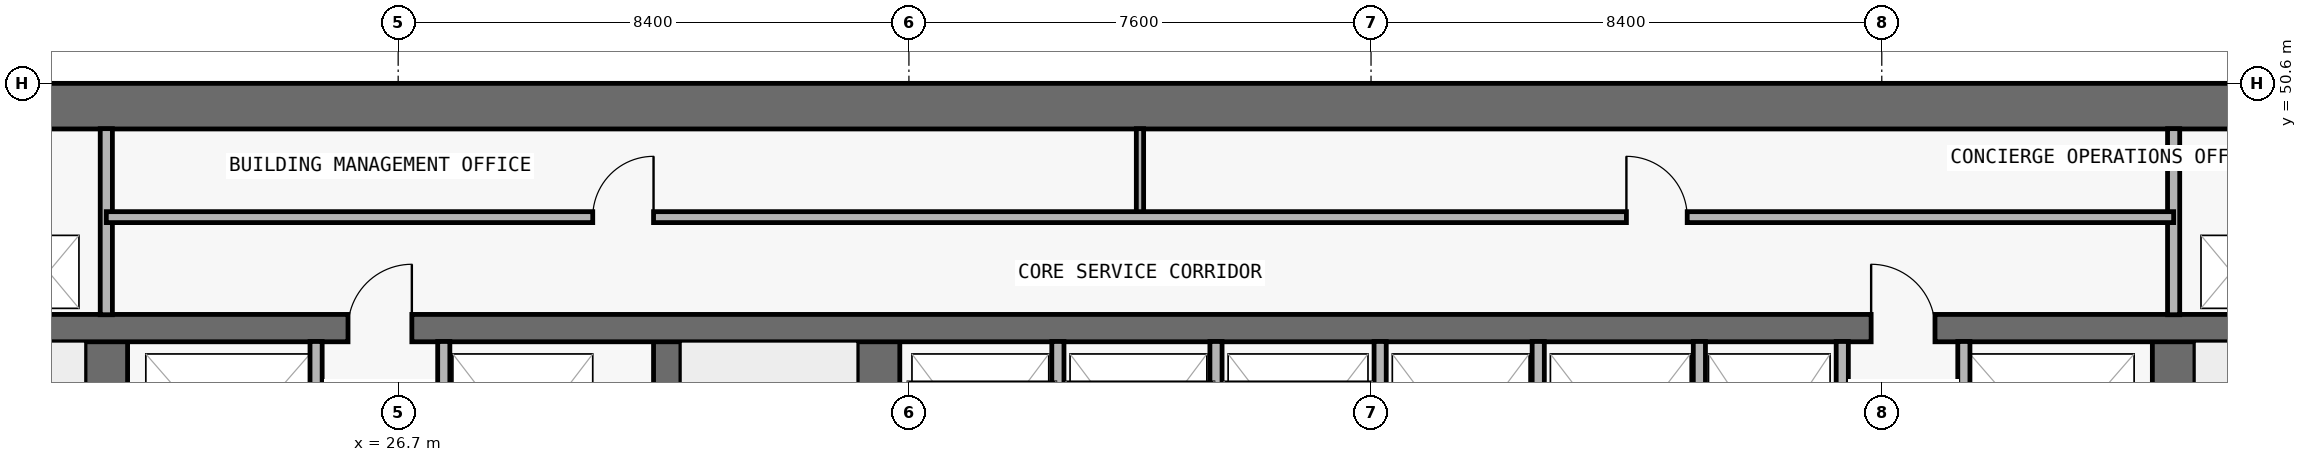
"""IFC4 building model, lengths in metres.
Left out: names, types, materials, properties, quantities, classifications, styles, units other than length and angle.
Written with IfcOpenShell. Run it as: python <this file> out.ifc"""

import sys

from ifc_helpers import new_model, si_unit, direction, frame, frame_2d, origin, place, context, subcontext, project, spatial, rectangle, extrude, element, fill, save


model = new_model("IFC4")
c1 = context("Model", 3, precision=1e-05, world=origin(), true_north=direction((0.0, 1.0)))
c2 = subcontext(c1, "Body", "Model", "MODEL_VIEW")
j1 = project(units=[si_unit("LENGTHUNIT", "METRE"), si_unit("PLANEANGLEUNIT", "RADIAN")], contexts=[c1])
p1 = place(None, origin())
s1 = spatial("IfcSite", under=j1, at=p1, CompositionType="ELEMENT")
p2 = place(p1, origin())
s2 = spatial("IfcBuilding", under=s1, at=p2, CompositionType="ELEMENT")
p3 = place(p2, frame((0.0, 0.0, 72.9)))
s3 = spatial("IfcBuildingStorey", under=s2, at=p3, CompositionType="ELEMENT", Elevation=72.9)
p4 = place(p3, frame((17.75, 50.225, 0.0), z_axis=(0.0, 0.0, 1.0), x_axis=(1.0, 0.0, 0.0)))
e1 = element("IfcWall", 1, at=p4, inside=s3, PredefinedType="SHEAR", context=c2, shape_type="SweptSolid", body=[
    extrude(rectangle(XDim=42.3, YDim=0.75, at=frame_2d((21.15, 0.0))), origin(), (0.0, 0.0, 1.0), 3.05),
])
p5 = place(p3, frame((21.9, 36.9, 0.0), z_axis=(0.0, 0.0, 1.0), x_axis=(0.0, 1.0, 0.0)))
e2 = element("IfcWall", 2, at=p5, inside=s3, PredefinedType="SHEAR", context=c2, shape_type="SweptSolid", body=[
    extrude(rectangle(XDim=9.675, YDim=0.7, at=frame_2d((4.837, 0.0))), origin(), (0.0, 0.0, 1.0), 3.05),
])
p6 = place(p5, frame((0.65, 0.0, 0.0)))
e3 = element("IfcOpeningElement", 3, at=p6, cuts=e2, PredefinedType="OPENING", context=c2, shape_type="SweptSolid", body=[
    extrude(rectangle(XDim=1.1, YDim=2.15, at=frame_2d((0.55, 1.075))), frame((0.0, 0.36, 0.0), z_axis=(0.0, -1.0, 0.0), x_axis=(1.0, 0.0, 0.0)), (0.0, 0.0, 1.0), 0.72),
])
p7 = place(p3, frame((55.9, 36.9, 0.0), z_axis=(0.0, 0.0, 1.0), x_axis=(0.0, 1.0, 0.0)))
e4 = element("IfcWall", 4, at=p7, inside=s3, PredefinedType="SHEAR", context=c2, shape_type="SweptSolid", body=[
    extrude(rectangle(XDim=9.675, YDim=0.7, at=frame_2d((4.837, 0.0))), origin(), (0.0, 0.0, 1.0), 3.05),
])
p8 = place(p7, frame((0.65, 0.0, 0.0)))
e5 = element("IfcOpeningElement", 5, at=p8, cuts=e4, PredefinedType="OPENING", context=c2, shape_type="SweptSolid", body=[
    extrude(rectangle(XDim=1.1, YDim=2.15, at=frame_2d((0.55, 1.075))), frame((0.0, 0.36, 0.0), z_axis=(0.0, -1.0, 0.0), x_axis=(1.0, 0.0, 0.0)), (0.0, 0.0, 1.0), 0.72),
])
p9 = place(p3, frame((31.125, 36.9, 0.0), z_axis=(0.0, 0.0, 1.0), x_axis=(0.0, 1.0, 0.0)))
e6 = element("IfcWall", 6, at=p9, inside=s3, PredefinedType="SHEAR", context=c2, shape_type="SweptSolid", body=[
    extrude(rectangle(XDim=9.675, YDim=0.45, at=frame_2d((4.837, 0.0))), origin(), (0.0, 0.0, 1.0), 3.05),
])
p10 = place(p3, frame((34.6, 36.9, 0.0), z_axis=(0.0, 0.0, 1.0), x_axis=(0.0, 1.0, 0.0)))
e7 = element("IfcWall", 7, at=p10, inside=s3, PredefinedType="SHEAR", context=c2, shape_type="SweptSolid", body=[
    extrude(rectangle(XDim=9.675, YDim=0.7, at=frame_2d((4.837, 0.0))), origin(), (0.0, 0.0, 1.0), 3.05),
])
p11 = place(p3, frame((18.2, 46.575, 0.0), z_axis=(0.0, 0.0, 1.0), x_axis=(1.0, 0.0, 0.0)))
e8 = element("IfcWall", 8, at=p11, inside=s3, PredefinedType="SHEAR", context=c2, shape_type="SweptSolid", body=[
    extrude(rectangle(XDim=41.4, YDim=0.45, at=frame_2d((20.7, 0.0))), origin(), (0.0, 0.0, 1.0), 3.05),
])
p12 = place(p11, frame((7.675, 0.0, 0.0)))
e9 = element("IfcOpeningElement", 9, at=p12, cuts=e8, PredefinedType="OPENING", context=c2, shape_type="SweptSolid", body=[
    extrude(rectangle(XDim=1.05, YDim=2.15, at=frame_2d((0.525, 1.075))), frame((0.0, 0.235, 0.0), z_axis=(0.0, -1.0, 0.0), x_axis=(1.0, 0.0, 0.0)), (0.0, 0.0, 1.0), 0.47),
])
p13 = place(p11, frame((32.725, 0.0, 0.0)))
e10 = element("IfcOpeningElement", 10, at=p13, cuts=e8, PredefinedType="OPENING", context=c2, shape_type="SweptSolid", body=[
    extrude(rectangle(XDim=1.05, YDim=2.15, at=frame_2d((0.525, 1.075))), frame((0.0, 0.235, 0.0), z_axis=(0.0, -1.0, 0.0), x_axis=(1.0, 0.0, 0.0)), (0.0, 0.0, 1.0), 0.47),
])
p14 = place(p3, frame((21.9, 46.795, 0.0), z_axis=(0.0, 0.0, 1.0), x_axis=(0.0, 1.0, 0.0)))
e11 = element("IfcWall", 11, at=p14, inside=s3, PredefinedType="PARTITIONING", context=c2, shape_type="SweptSolid", body=[
    extrude(rectangle(XDim=3.06, YDim=0.2, at=frame_2d((1.53, 0.0))), origin(), (0.0, 0.0, 1.0), 3.05),
])
for number, where, z_axis, x_axis in (
    (12, (25.35, 43.17, 0.0), (0.0, 0.0, 1.0), (0.0, 1.0, 0.0)),
    (13, (27.45, 43.17, 0.0), (0.0, 0.0, 1.0), (0.0, 1.0, 0.0)),
    (14, (37.55, 43.17, 0.0), (0.0, 0.0, 1.0), (0.0, 1.0, 0.0)),
):
    element("IfcWall", number, at=place(p3, frame(where, z_axis=z_axis, x_axis=x_axis)), inside=s3, PredefinedType="PARTITIONING", context=c2, shape_type="SweptSolid", body=[
        extrude(rectangle(XDim=3.185, YDim=0.2, at=frame_2d((1.593, 0.0))), origin(), (0.0, 0.0, 1.0), 3.05),
    ])
p15 = place(p3, frame((38.9, 48.4, 0.0), z_axis=(0.0, 0.0, 1.0), x_axis=(0.0, 1.0, 0.0)))
e15 = element("IfcWall", 15, at=p15, inside=s3, PredefinedType="PARTITIONING", context=c2, shape_type="SweptSolid", body=[
    extrude(rectangle(XDim=1.455, YDim=0.12, at=frame_2d((0.728, 0.0))), origin(), (0.0, 0.0, 1.0), 3.05),
])
for number, where, z_axis, x_axis in (
    (16, (40.15, 43.17, 0.0), (0.0, 0.0, 1.0), (0.0, 1.0, 0.0)),
    (17, (42.85, 43.17, 0.0), (0.0, 0.0, 1.0), (0.0, 1.0, 0.0)),
    (18, (45.45, 43.17, 0.0), (0.0, 0.0, 1.0), (0.0, 1.0, 0.0)),
    (19, (48.1, 43.17, 0.0), (0.0, 0.0, 1.0), (0.0, 1.0, 0.0)),
    (20, (50.45, 43.17, 0.0), (0.0, 0.0, 1.0), (0.0, 1.0, 0.0)),
    (21, (52.45, 43.17, 0.0), (0.0, 0.0, 1.0), (0.0, 1.0, 0.0)),
):
    element("IfcWall", number, at=place(p3, frame(where, z_axis=z_axis, x_axis=x_axis)), inside=s3, PredefinedType="PARTITIONING", context=c2, shape_type="SweptSolid", body=[
        extrude(rectangle(XDim=3.185, YDim=0.2, at=frame_2d((1.593, 0.0))), origin(), (0.0, 0.0, 1.0), 3.05),
    ])
p16 = place(p3, frame((55.9, 46.795, 0.0), z_axis=(0.0, 0.0, 1.0), x_axis=(0.0, 1.0, 0.0)))
e22 = element("IfcWall", 22, at=p16, inside=s3, PredefinedType="PARTITIONING", context=c2, shape_type="SweptSolid", body=[
    extrude(rectangle(XDim=3.06, YDim=0.2, at=frame_2d((1.53, 0.0))), origin(), (0.0, 0.0, 1.0), 3.05),
])
p17 = place(p3, frame((21.9, 48.4, 0.0), z_axis=(0.0, 0.0, 1.0), x_axis=(1.0, 0.0, 0.0)))
e23 = element("IfcWall", 23, at=p17, inside=s3, PredefinedType="PARTITIONING", context=c2, shape_type="SweptSolid", body=[
    extrude(rectangle(XDim=34.0, YDim=0.18, at=frame_2d((17.0, 0.0))), origin(), (0.0, 0.0, 1.0), 3.05),
])
p18 = place(p17, frame((8.0, 0.0, 0.0)))
e24 = element("IfcOpeningElement", 24, at=p18, cuts=e23, PredefinedType="OPENING", context=c2, shape_type="SweptSolid", body=[
    extrude(rectangle(XDim=1.0, YDim=2.2, at=frame_2d((0.5, 1.1))), frame((0.0, 0.1, 0.0), z_axis=(0.0, -1.0, 0.0), x_axis=(1.0, 0.0, 0.0)), (0.0, 0.0, 1.0), 0.2),
])
p19 = place(p17, frame((25.0, 0.0, 0.0)))
e25 = element("IfcOpeningElement", 25, at=p19, cuts=e23, PredefinedType="OPENING", context=c2, shape_type="SweptSolid", body=[
    extrude(rectangle(XDim=1.0, YDim=2.2, at=frame_2d((0.5, 1.1))), frame((0.0, 0.1, 0.0), z_axis=(0.0, -1.0, 0.0), x_axis=(1.0, 0.0, 0.0)), (0.0, 0.0, 1.0), 0.2),
])
p20 = place(p12, origin())
e26 = element("IfcDoor", 26, at=p20, inside=s3, OperationType="SINGLE_SWING_RIGHT", PredefinedType="DOOR", context=c2, shape_type="SweptSolid", body=[
    extrude(rectangle(XDim=1.05, YDim=2.15, at=frame_2d((0.525, 1.075))), frame((0.0, 0.025, 0.0), z_axis=(0.0, -1.0, 0.0), x_axis=(1.0, 0.0, 0.0)), (0.0, 0.0, 1.0), 0.05),
])
fill(e9, e26)
p21 = place(p13, origin())
e27 = element("IfcDoor", 27, at=p21, inside=s3, OperationType="SINGLE_SWING_LEFT", PredefinedType="DOOR", context=c2, shape_type="SweptSolid", body=[
    extrude(rectangle(XDim=1.05, YDim=2.15, at=frame_2d((0.525, 1.075))), frame((0.0, 0.025, 0.0), z_axis=(0.0, -1.0, 0.0), x_axis=(1.0, 0.0, 0.0)), (0.0, 0.0, 1.0), 0.05),
])
fill(e10, e27)
p22 = place(p18, origin())
e28 = element("IfcDoor", 28, at=p22, inside=s3, OperationType="SINGLE_SWING_RIGHT", PredefinedType="DOOR", context=c2, shape_type="SweptSolid", body=[
    extrude(rectangle(XDim=1.0, YDim=2.2, at=frame_2d((0.5, 1.1))), frame((0.0, 0.025, 0.0), z_axis=(0.0, -1.0, 0.0), x_axis=(1.0, 0.0, 0.0)), (0.0, 0.0, 1.0), 0.05),
])
fill(e24, e28)
p23 = place(p19, origin())
e29 = element("IfcDoor", 29, at=p23, inside=s3, OperationType="SINGLE_SWING_LEFT", PredefinedType="DOOR", context=c2, shape_type="SweptSolid", body=[
    extrude(rectangle(XDim=1.0, YDim=2.2, at=frame_2d((0.5, 1.1))), frame((0.0, 0.025, 0.0), z_axis=(0.0, -1.0, 0.0), x_axis=(1.0, 0.0, 0.0)), (0.0, 0.0, 1.0), 0.05),
])
fill(e25, e29)
save(model, sys.argv[1])
